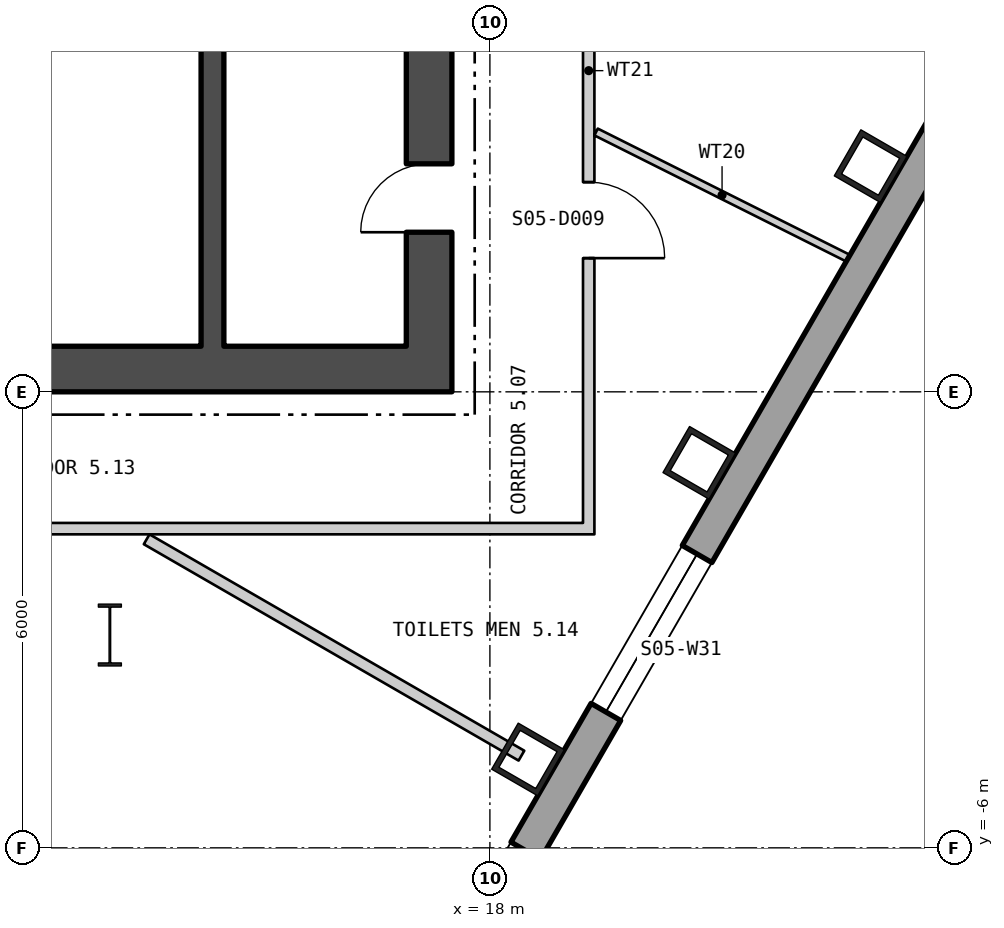
"""IFC4 building model, lengths in metres.
Left out: names, types, materials, properties, quantities, classifications, styles, units other than length and angle.
Written with IfcOpenShell. Run it as: python <this file> out.ifc"""

import sys

from ifc_helpers import new_model, si_unit, direction, frame, frame_2d, origin, origin_2d, place, context, subcontext, project, spatial, polyline, rectangle, hollow_rectangle, i_section, outline, extrude, element, fill, save


model = new_model("IFC4")
c1 = context("Model", 3, precision=1e-05, world=origin(), true_north=direction((0.0, 1.0)))
c2 = subcontext(c1, "Body", "Model", "MODEL_VIEW")
j1 = project(units=[si_unit("LENGTHUNIT", "METRE"), si_unit("PLANEANGLEUNIT", "RADIAN")], contexts=[c1])
p1 = place(None, origin())
s1 = spatial("IfcSite", under=j1, at=p1, CompositionType="ELEMENT")
p2 = place(p1, origin())
s2 = spatial("IfcBuilding", under=s1, at=p2, CompositionType="ELEMENT")
p3 = place(p2, frame((0.0, 0.0, 69.3)))
s3 = spatial("IfcBuildingStorey", under=s2, at=p3, CompositionType="ELEMENT", Elevation=69.3)
for number, where, z_axis, x_axis in (
    (1, (18.501, -4.837, 0.0), (0.0, 0.0, 1.0), (0.5, 0.866, 0.0)),
    (2, (20.755, -0.934, 0.0), (0.0, 0.0, 1.0), (0.5, 0.866, 0.0)),
    (3, (23.009, 2.97, 0.0), (0.0, 0.0, 1.0), (0.5, 0.866, 0.0)),
):
    element("IfcColumn", number, at=place(p3, frame(where, z_axis=z_axis, x_axis=x_axis)), inside=s3, PredefinedType="COLUMN", context=c2, shape_type="SweptSolid", body=[
        extrude(hollow_rectangle(XDim=0.7, YDim=0.7, WallThickness=0.07, at=origin_2d()), origin(), (0.0, 0.0, 1.0), 4.5),
    ])
p4 = place(p3, frame((13.0, -3.2, 0.0), z_axis=(0.0, 0.0, 1.0), x_axis=(1.0, 0.0, 0.0)))
e4 = element("IfcColumn", 4, at=p4, inside=s3, PredefinedType="COLUMN", context=c2, shape_type="SweptSolid", body=[
    extrude(i_section(OverallWidth=0.303, OverallDepth=0.814, WebThickness=0.021, FlangeThickness=0.04, at=origin_2d()), origin(), (0.0, 0.0, 1.0), 4.5),
])
p5 = place(p3, frame((5.31, -28.834, -0.18), z_axis=(0.0, 0.0, 1.0), x_axis=(0.500000711659, 0.866024992908, 0.0)))
e5 = element("IfcWall", 5, at=p5, inside=s3, PredefinedType="SOLIDWALL", context=c2, shape_type="SweptSolid", body=[
    extrude(outline(polyline([(-0.13, -0.225), (45.87, -0.225), (45.61, 0.225), (0.13, 0.225), (-0.13, -0.225)])), origin(), (0.0, 0.0, 1.0), 4.28),
])
p6 = place(p5, frame((1.424, 0.0, 1.08)))
e6 = element("IfcOpeningElement", 6, at=p6, cuts=e5, PredefinedType="OPENING", context=c2, shape_type="SweptSolid", body=[
    extrude(rectangle(XDim=2.4, YDim=2.6, at=frame_2d((1.2, 1.3))), frame((0.0, 0.235, 0.0), z_axis=(0.0, -1.0, 0.0), x_axis=(1.0, 0.0, 0.0)), (0.0, 0.0, 1.0), 0.47),
])
p7 = place(p5, frame((5.893, 0.0, 1.08)))
e7 = element("IfcOpeningElement", 7, at=p7, cuts=e5, PredefinedType="OPENING", context=c2, shape_type="SweptSolid", body=[
    extrude(rectangle(XDim=2.4, YDim=2.6, at=frame_2d((1.2, 1.3))), frame((0.0, 0.235, 0.0), z_axis=(0.0, -1.0, 0.0), x_axis=(1.0, 0.0, 0.0)), (0.0, 0.0, 1.0), 0.47),
])
p8 = place(p5, frame((10.401, 0.0, 1.08)))
e8 = element("IfcOpeningElement", 8, at=p8, cuts=e5, PredefinedType="OPENING", context=c2, shape_type="SweptSolid", body=[
    extrude(rectangle(XDim=2.4, YDim=2.6, at=frame_2d((1.2, 1.3))), frame((0.0, 0.235, 0.0), z_axis=(0.0, -1.0, 0.0), x_axis=(1.0, 0.0, 0.0)), (0.0, 0.0, 1.0), 0.47),
])
p9 = place(p5, frame((14.909, 0.0, 1.08)))
e9 = element("IfcOpeningElement", 9, at=p9, cuts=e5, PredefinedType="OPENING", context=c2, shape_type="SweptSolid", body=[
    extrude(rectangle(XDim=2.4, YDim=2.6, at=frame_2d((1.2, 1.3))), frame((0.0, 0.235, 0.0), z_axis=(0.0, -1.0, 0.0), x_axis=(1.0, 0.0, 0.0)), (0.0, 0.0, 1.0), 0.47),
])
p10 = place(p5, frame((19.416, 0.0, 1.08)))
e10 = element("IfcOpeningElement", 10, at=p10, cuts=e5, PredefinedType="OPENING", context=c2, shape_type="SweptSolid", body=[
    extrude(rectangle(XDim=2.4, YDim=2.6, at=frame_2d((1.2, 1.3))), frame((0.0, 0.235, 0.0), z_axis=(0.0, -1.0, 0.0), x_axis=(1.0, 0.0, 0.0)), (0.0, 0.0, 1.0), 0.47),
])
p11 = place(p5, frame((23.924, 0.0, 1.08)))
e11 = element("IfcOpeningElement", 11, at=p11, cuts=e5, PredefinedType="OPENING", context=c2, shape_type="SweptSolid", body=[
    extrude(rectangle(XDim=2.4, YDim=2.6, at=frame_2d((1.2, 1.3))), frame((0.0, 0.235, 0.0), z_axis=(0.0, -1.0, 0.0), x_axis=(1.0, 0.0, 0.0)), (0.0, 0.0, 1.0), 0.47),
])
p12 = place(p5, frame((28.431, 0.0, 1.08)))
e12 = element("IfcOpeningElement", 12, at=p12, cuts=e5, PredefinedType="OPENING", context=c2, shape_type="SweptSolid", body=[
    extrude(rectangle(XDim=2.4, YDim=2.6, at=frame_2d((1.2, 1.3))), frame((0.0, 0.235, 0.0), z_axis=(0.0, -1.0, 0.0), x_axis=(1.0, 0.0, 0.0)), (0.0, 0.0, 1.0), 0.47),
])
p13 = place(p5, frame((37.447, 0.0, 1.08)))
e13 = element("IfcOpeningElement", 13, at=p13, cuts=e5, PredefinedType="OPENING", context=c2, shape_type="SweptSolid", body=[
    extrude(rectangle(XDim=2.4, YDim=2.6, at=frame_2d((1.2, 1.3))), frame((0.0, 0.235, 0.0), z_axis=(0.0, -1.0, 0.0), x_axis=(1.0, 0.0, 0.0)), (0.0, 0.0, 1.0), 0.47),
])
p14 = place(p5, frame((41.916, 0.0, 1.08)))
e14 = element("IfcOpeningElement", 14, at=p14, cuts=e5, PredefinedType="OPENING", context=c2, shape_type="SweptSolid", body=[
    extrude(rectangle(XDim=2.4, YDim=2.6, at=frame_2d((1.2, 1.3))), frame((0.0, 0.235, 0.0), z_axis=(0.0, -1.0, 0.0), x_axis=(1.0, 0.0, 0.0)), (0.0, 0.0, 1.0), 0.47),
])
p15 = place(p3, frame((-17.5, 0.3, 0.0), z_axis=(0.0, 0.0, 1.0), x_axis=(1.0, 0.0, 0.0)))
e15 = element("IfcWall", 15, at=p15, inside=s3, PredefinedType="SHEAR", context=c2, shape_type="SweptSolid", body=[
    extrude(rectangle(XDim=35.0, YDim=0.6, at=frame_2d((17.5, 0.0))), origin(), (0.0, 0.0, 1.0), 4.3),
])
p16 = place(p15, frame((12.0, 0.0, 0.0)))
e16 = element("IfcOpeningElement", 16, at=p16, cuts=e15, PredefinedType="OPENING", context=c2, shape_type="SweptSolid", body=[
    extrude(rectangle(XDim=1.8, YDim=2.4, at=frame_2d((0.9, 1.2))), frame((0.0, 0.31, 0.0), z_axis=(0.0, -1.0, 0.0), x_axis=(1.0, 0.0, 0.0)), (0.0, 0.0, 1.0), 0.62),
])
p17 = place(p15, frame((22.0, 0.0, 0.0)))
e17 = element("IfcOpeningElement", 17, at=p17, cuts=e15, PredefinedType="OPENING", context=c2, shape_type="SweptSolid", body=[
    extrude(rectangle(XDim=1.8, YDim=2.4, at=frame_2d((0.9, 1.2))), frame((0.0, 0.31, 0.0), z_axis=(0.0, -1.0, 0.0), x_axis=(1.0, 0.0, 0.0)), (0.0, 0.0, 1.0), 0.62),
])
p18 = place(p3, frame((17.2, 0.6, 0.0), z_axis=(0.0, 0.0, 1.0), x_axis=(0.0, 1.0, 0.0)))
e18 = element("IfcWall", 18, at=p18, inside=s3, PredefinedType="SHEAR", context=c2, shape_type="SweptSolid", body=[
    extrude(rectangle(XDim=16.8, YDim=0.6, at=frame_2d((8.4, 0.0))), origin(), (0.0, 0.0, 1.0), 4.3),
])
p19 = place(p18, frame((5.7, 0.0, 0.0)))
e19 = element("IfcOpeningElement", 19, at=p19, cuts=e18, PredefinedType="OPENING", context=c2, shape_type="SweptSolid", body=[
    extrude(rectangle(XDim=1.5, YDim=2.1, at=frame_2d((0.75, 1.05))), frame((0.0, 0.31, 0.0), z_axis=(0.0, -1.0, 0.0), x_axis=(1.0, 0.0, 0.0)), (0.0, 0.0, 1.0), 0.62),
])
p20 = place(p18, frame((1.5, 0.0, 0.0)))
e20 = element("IfcOpeningElement", 20, at=p20, cuts=e18, PredefinedType="OPENING", context=c2, shape_type="SweptSolid", body=[
    extrude(rectangle(XDim=0.9, YDim=2.1, at=frame_2d((0.45, 1.05))), frame((0.0, 0.31, 0.0), z_axis=(0.0, -1.0, 0.0), x_axis=(1.0, 0.0, 0.0)), (0.0, 0.0, 1.0), 0.62),
])
p21 = place(p18, frame((4.35, 0.0, 0.0)))
e21 = element("IfcOpeningElement", 21, at=p21, cuts=e18, PredefinedType="OPENING", context=c2, shape_type="SweptSolid", body=[
    extrude(rectangle(XDim=0.9, YDim=2.1, at=frame_2d((0.45, 1.05))), frame((0.0, 0.31, 0.0), z_axis=(0.0, -1.0, 0.0), x_axis=(1.0, 0.0, 0.0)), (0.0, 0.0, 1.0), 0.62),
])
p22 = place(p18, frame((7.996, 0.0, 0.0)))
e22 = element("IfcOpeningElement", 22, at=p22, cuts=e18, PredefinedType="OPENING", context=c2, shape_type="SweptSolid", body=[
    extrude(rectangle(XDim=1.0, YDim=2.1, at=frame_2d((0.5, 1.05))), frame((0.0, 0.31, 0.0), z_axis=(0.0, -1.0, 0.0), x_axis=(1.0, 0.0, 0.0)), (0.0, 0.0, 1.0), 0.62),
])
p23 = place(p18, frame((12.846, 0.0, 0.0)))
e23 = element("IfcOpeningElement", 23, at=p23, cuts=e18, PredefinedType="OPENING", context=c2, shape_type="SweptSolid", body=[
    extrude(rectangle(XDim=0.9, YDim=2.1, at=frame_2d((0.45, 1.05))), frame((0.0, 0.31, 0.0), z_axis=(0.0, -1.0, 0.0), x_axis=(1.0, 0.0, 0.0)), (0.0, 0.0, 1.0), 0.62),
])
p24 = place(p3, frame((14.35, 0.6, 0.0), z_axis=(0.0, 0.0, 1.0), x_axis=(0.0, 1.0, 0.0)))
e24 = element("IfcWall", 24, at=p24, inside=s3, PredefinedType="SHEAR", context=c2, shape_type="SweptSolid", body=[
    extrude(rectangle(XDim=16.8, YDim=0.3, at=frame_2d((8.4, 0.0))), origin(), (0.0, 0.0, 1.0), 4.3),
])
p25 = place(p24, frame((5.7, 0.0, 0.0)))
e25 = element("IfcOpeningElement", 25, at=p25, cuts=e24, PredefinedType="OPENING", context=c2, shape_type="SweptSolid", body=[
    extrude(rectangle(XDim=1.5, YDim=2.1, at=frame_2d((0.75, 1.05))), frame((0.0, 0.16, 0.0), z_axis=(0.0, -1.0, 0.0), x_axis=(1.0, 0.0, 0.0)), (0.0, 0.0, 1.0), 0.32),
])
p26 = place(p3, frame((7.795, -1.8, 0.0), z_axis=(0.0, 0.0, 1.0), x_axis=(1.0, 0.0, 0.0)))
e26 = element("IfcWall", 26, at=p26, inside=s3, PredefinedType="PARTITIONING", context=c2, shape_type="SweptSolid", body=[
    extrude(rectangle(XDim=11.43, YDim=0.15, at=frame_2d((5.715, 0.0))), origin(), (0.0, 0.0, 1.0), 4.3),
])
p27 = place(p26, frame((2.121, 0.0, 0.0)))
e27 = element("IfcOpeningElement", 27, at=p27, cuts=e26, PredefinedType="OPENING", context=c2, shape_type="SweptSolid", body=[
    extrude(rectangle(XDim=1.0, YDim=2.1, at=frame_2d((0.5, 1.05))), frame((0.0, 0.085, 0.0), z_axis=(0.0, -1.0, 0.0), x_axis=(1.0, 0.0, 0.0)), (0.0, 0.0, 1.0), 0.17),
])
p28 = place(p3, frame((13.484, -1.94, 0.0), z_axis=(0.0, 0.0, 1.0), x_axis=(0.866018876994, -0.500011304563, 0.0)))
e28 = element("IfcWall", 28, at=p28, inside=s3, PredefinedType="PARTITIONING", context=c2, shape_type="SweptSolid", body=[
    extrude(rectangle(XDim=5.694, YDim=0.15, at=frame_2d((2.847, 0.0))), origin(), (0.0, 0.0, 1.0), 4.3),
])
p29 = place(p3, frame((19.3, -1.875, 0.0), z_axis=(0.0, 0.0, 1.0), x_axis=(0.0, 1.0, 0.0)))
e29 = element("IfcWall", 29, at=p29, inside=s3, PredefinedType="PARTITIONING", context=c2, shape_type="SweptSolid", body=[
    extrude(rectangle(XDim=12.202, YDim=0.15, at=frame_2d((6.101, 0.0))), origin(), (0.0, 0.0, 1.0), 4.3),
])
p30 = place(p29, frame((3.634, 0.0, 0.0)))
e30 = element("IfcOpeningElement", 30, at=p30, cuts=e29, PredefinedType="OPENING", context=c2, shape_type="SweptSolid", body=[
    extrude(rectangle(XDim=1.0, YDim=2.1, at=frame_2d((0.5, 1.05))), frame((0.0, 0.085, 0.0), z_axis=(0.0, -1.0, 0.0), x_axis=(1.0, 0.0, 0.0)), (0.0, 0.0, 1.0), 0.17),
])
p31 = place(p29, frame((6.658, 0.0, 0.0)))
e31 = element("IfcOpeningElement", 31, at=p31, cuts=e29, PredefinedType="OPENING", context=c2, shape_type="SweptSolid", body=[
    extrude(rectangle(XDim=1.0, YDim=2.1, at=frame_2d((0.5, 1.05))), frame((0.0, 0.085, 0.0), z_axis=(0.0, -1.0, 0.0), x_axis=(1.0, 0.0, 0.0)), (0.0, 0.0, 1.0), 0.17),
])
p32 = place(p29, frame((10.081, 0.0, 0.0)))
e32 = element("IfcOpeningElement", 32, at=p32, cuts=e29, PredefinedType="OPENING", context=c2, shape_type="SweptSolid", body=[
    extrude(rectangle(XDim=1.0, YDim=2.1, at=frame_2d((0.5, 1.05))), frame((0.0, 0.085, 0.0), z_axis=(0.0, -1.0, 0.0), x_axis=(1.0, 0.0, 0.0)), (0.0, 0.0, 1.0), 0.17),
])
p33 = place(p3, frame((19.397, 3.419, 0.0), z_axis=(0.0, 0.0, 1.0), x_axis=(0.894157297607, -0.447752975574, 0.0)))
e33 = element("IfcWall", 33, at=p33, inside=s3, PredefinedType="PARTITIONING", context=c2, shape_type="SweptSolid", body=[
    extrude(rectangle(XDim=3.707, YDim=0.1, at=frame_2d((1.854, 0.0))), origin(), (0.0, 0.0, 1.0), 4.3),
])
p34 = place(p11, origin())
e34 = element("IfcWindow", 34, at=p34, inside=s3, PartitioningType="SINGLE_PANEL", PredefinedType="WINDOW", context=c2, shape_type="SweptSolid", body=[
    extrude(rectangle(XDim=2.4, YDim=2.6, at=frame_2d((1.2, 1.3))), frame((0.0, 0.105, 0.0), z_axis=(0.0, -1.0, 0.0), x_axis=(1.0, 0.0, 0.0)), (0.0, 0.0, 1.0), 0.06),
])
fill(e11, e34)
p35 = place(p12, origin())
e35 = element("IfcWindow", 35, at=p35, inside=s3, PartitioningType="SINGLE_PANEL", PredefinedType="WINDOW", context=c2, shape_type="SweptSolid", body=[
    extrude(rectangle(XDim=2.4, YDim=2.6, at=frame_2d((1.2, 1.3))), frame((0.0, 0.105, 0.0), z_axis=(0.0, -1.0, 0.0), x_axis=(1.0, 0.0, 0.0)), (0.0, 0.0, 1.0), 0.06),
])
fill(e12, e35)
p36 = place(p20, origin())
e36 = element("IfcDoor", 36, at=p36, inside=s3, OperationType="SINGLE_SWING_RIGHT", PredefinedType="DOOR", context=c2, shape_type="SweptSolid", body=[
    extrude(rectangle(XDim=0.9, YDim=2.1, at=frame_2d((0.45, 1.05))), frame((0.0, 0.025, 0.0), z_axis=(0.0, -1.0, 0.0), x_axis=(1.0, 0.0, 0.0)), (0.0, 0.0, 1.0), 0.05),
])
fill(e20, e36)
p37 = place(p30, origin())
e37 = element("IfcDoor", 37, at=p37, inside=s3, OperationType="SINGLE_SWING_LEFT", PredefinedType="DOOR", context=c2, shape_type="SweptSolid", body=[
    extrude(rectangle(XDim=1.0, YDim=2.1, at=frame_2d((0.5, 1.05))), frame((0.0, 0.025, 0.0), z_axis=(0.0, -1.0, 0.0), x_axis=(1.0, 0.0, 0.0)), (0.0, 0.0, 1.0), 0.05),
])
fill(e30, e37)
save(model, sys.argv[1])
